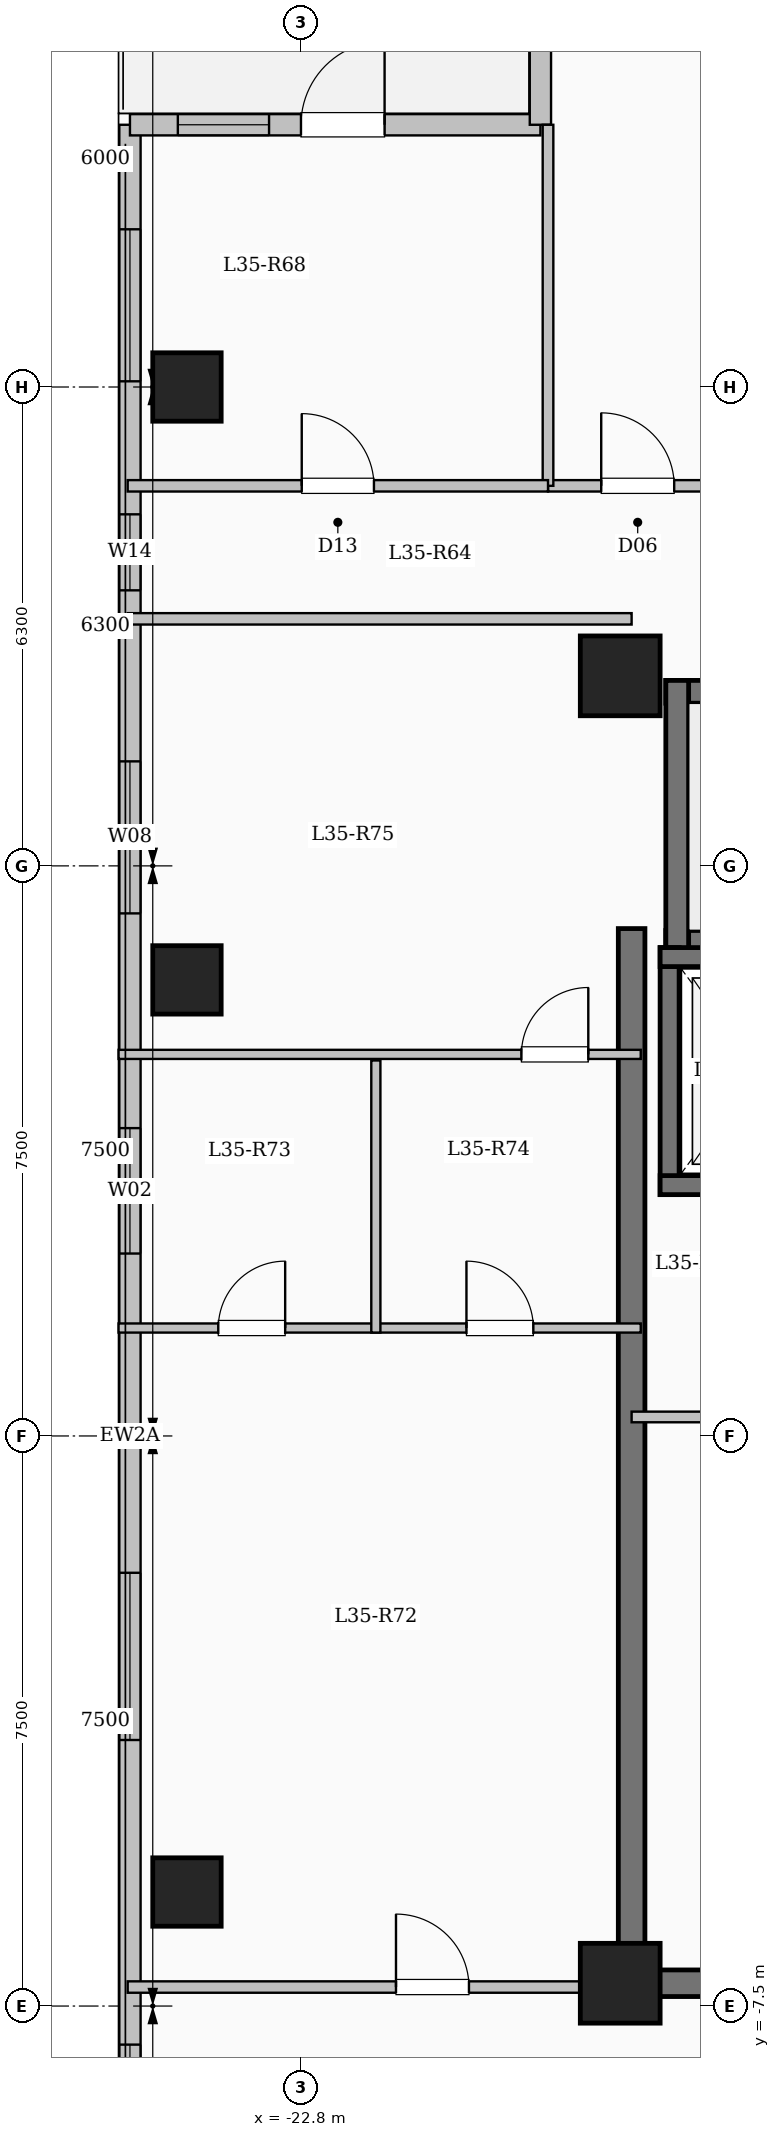
"""IFC4 building model, lengths in metres.
Left out: names, types, materials, properties, quantities, classifications, styles, units other than length and angle.
Written with IfcOpenShell. Run it as: python <this file> out.ifc"""

import sys

from ifc_helpers import new_model, si_unit, direction, frame, frame_2d, origin, origin_2d, place, context, subcontext, project, spatial, rectangle, extrude, element, fill, save


model = new_model("IFC4")
c1 = context("Model", 3, precision=1e-05, world=origin(), true_north=direction((0.0, 1.0)))
c2 = subcontext(c1, "Body", "Model", "MODEL_VIEW")
j1 = project(units=[si_unit("LENGTHUNIT", "METRE"), si_unit("PLANEANGLEUNIT", "RADIAN")], contexts=[c1])
p1 = place(None, origin())
s1 = spatial("IfcSite", under=j1, at=p1, CompositionType="ELEMENT")
p2 = place(p1, origin())
s2 = spatial("IfcBuilding", under=s1, at=p2, CompositionType="ELEMENT")
p3 = place(p2, frame((0.0, 0.0, 132.6)))
s3 = spatial("IfcBuildingStorey", under=s2, at=p3, CompositionType="ELEMENT", Elevation=132.6)
for number, where, z_axis, x_axis in (
    (1, (-18.6, -7.2, 0.0), (0.0, 0.0, 1.0), (1.0, 0.0, 0.0)),
    (2, (-18.6, 10.0, 0.0), (0.0, 0.0, 1.0), (1.0, 0.0, 0.0)),
):
    element("IfcColumn", number, at=place(p3, frame(where, z_axis=z_axis, x_axis=x_axis)), inside=s3, PredefinedType="COLUMN", context=c2, shape_type="SweptSolid", body=[
        extrude(rectangle(XDim=1.05, YDim=1.05, at=origin_2d()), origin(), (0.0, 0.0, 1.0), 3.35),
    ])
for number, where, z_axis, x_axis in (
    (3, (-24.3, -6.0, 0.0), (0.0, 0.0, 1.0), (1.0, 0.0, 0.0)),
    (4, (-24.3, 6.0, 0.0), (0.0, 0.0, 1.0), (1.0, 0.0, 0.0)),
    (5, (-24.3, 13.8, 0.0), (0.0, 0.0, 1.0), (1.0, 0.0, 0.0)),
):
    element("IfcColumn", number, at=place(p3, frame(where, z_axis=z_axis, x_axis=x_axis)), inside=s3, PredefinedType="COLUMN", context=c2, shape_type="SweptSolid", body=[
        extrude(rectangle(XDim=0.9, YDim=0.9, at=origin_2d()), origin(), (0.0, 0.0, 1.0), 3.35),
    ])
p4 = place(p3, frame((-25.05, -17.25, 0.0), z_axis=(0.0, 0.0, 1.0), x_axis=(0.0, 1.0, 0.0)))
e6 = element("IfcWall", 6, at=p4, inside=s3, PredefinedType="SOLIDWALL", context=c2, shape_type="SweptSolid", body=[
    extrude(rectangle(XDim=34.5, YDim=0.28, at=frame_2d((17.25, 0.0))), origin(), (0.0, 0.0, 1.0), 3.1),
])
p5 = place(p4, frame((2.35, 0.0, 0.9)))
e7 = element("IfcOpeningElement", 7, at=p5, cuts=e6, PredefinedType="OPENING", context=c2, shape_type="SweptSolid", body=[
    extrude(rectangle(XDim=2.2, YDim=1.75, at=frame_2d((1.1, 0.875))), frame((0.0, 0.15, 0.0), z_axis=(0.0, -1.0, 0.0), x_axis=(1.0, 0.0, 0.0)), (0.0, 0.0, 1.0), 0.3),
])
p6 = place(p4, frame((7.742, 0.0, 0.9)))
e8 = element("IfcOpeningElement", 8, at=p6, cuts=e6, PredefinedType="OPENING", context=c2, shape_type="SweptSolid", body=[
    extrude(rectangle(XDim=1.5, YDim=1.65, at=frame_2d((0.75, 0.825))), frame((0.0, 0.15, 0.0), z_axis=(0.0, -1.0, 0.0), x_axis=(1.0, 0.0, 0.0)), (0.0, 0.0, 1.0), 0.3),
])
p7 = place(p4, frame((13.25, 0.0, 0.9)))
e9 = element("IfcOpeningElement", 9, at=p7, cuts=e6, PredefinedType="OPENING", context=c2, shape_type="SweptSolid", body=[
    extrude(rectangle(XDim=2.2, YDim=1.75, at=frame_2d((1.1, 0.875))), frame((0.0, 0.15, 0.0), z_axis=(0.0, -1.0, 0.0), x_axis=(1.0, 0.0, 0.0)), (0.0, 0.0, 1.0), 0.3),
])
p8 = place(p4, frame((19.65, 0.0, 0.9)))
e10 = element("IfcOpeningElement", 10, at=p8, cuts=e6, PredefinedType="OPENING", context=c2, shape_type="SweptSolid", body=[
    extrude(rectangle(XDim=1.65, YDim=1.6, at=frame_2d((0.825, 0.8))), frame((0.0, 0.15, 0.0), z_axis=(0.0, -1.0, 0.0), x_axis=(1.0, 0.0, 0.0)), (0.0, 0.0, 1.0), 0.3),
])
p9 = place(p4, frame((24.125, 0.0, 0.9)))
e11 = element("IfcOpeningElement", 11, at=p9, cuts=e6, PredefinedType="OPENING", context=c2, shape_type="SweptSolid", body=[
    extrude(rectangle(XDim=2.0, YDim=1.7, at=frame_2d((1.0, 0.85))), frame((0.0, 0.15, 0.0), z_axis=(0.0, -1.0, 0.0), x_axis=(1.0, 0.0, 0.0)), (0.0, 0.0, 1.0), 0.3),
])
p10 = place(p4, frame((28.375, 0.0, 0.95)))
e12 = element("IfcOpeningElement", 12, at=p10, cuts=e6, PredefinedType="OPENING", context=c2, shape_type="SweptSolid", body=[
    extrude(rectangle(XDim=1.0, YDim=1.5, at=frame_2d((0.5, 0.75))), frame((0.0, 0.15, 0.0), z_axis=(0.0, -1.0, 0.0), x_axis=(1.0, 0.0, 0.0)), (0.0, 0.0, 1.0), 0.3),
])
p11 = place(p4, frame((31.125, 0.0, 0.9)))
e13 = element("IfcOpeningElement", 13, at=p11, cuts=e6, PredefinedType="OPENING", context=c2, shape_type="SweptSolid", body=[
    extrude(rectangle(XDim=2.0, YDim=1.7, at=frame_2d((1.0, 0.85))), frame((0.0, 0.15, 0.0), z_axis=(0.0, -1.0, 0.0), x_axis=(1.0, 0.0, 0.0)), (0.0, 0.0, 1.0), 0.3),
])
p12 = place(p3, frame((-25.05, 17.25, 0.0), z_axis=(0.0, 0.0, 1.0), x_axis=(1.0, 0.0, 0.0)))
e14 = element("IfcWall", 14, at=p12, inside=s3, PredefinedType="SOLIDWALL", context=c2, shape_type="SweptSolid", body=[
    extrude(rectangle(XDim=5.4, YDim=0.28, at=frame_2d((2.7, 0.0))), origin(), (0.0, 0.0, 1.0), 3.1),
])
p13 = place(p12, frame((2.25, 0.0, 0.0)))
e15 = element("IfcOpeningElement", 15, at=p13, cuts=e14, PredefinedType="OPENING", context=c2, shape_type="SweptSolid", body=[
    extrude(rectangle(XDim=1.1, YDim=2.2, at=frame_2d((0.55, 1.1))), frame((0.0, 0.15, 0.0), z_axis=(0.0, -1.0, 0.0), x_axis=(1.0, 0.0, 0.0)), (0.0, 0.0, 1.0), 0.3),
])
p14 = place(p12, frame((0.63, 0.0, 0.95)))
e16 = element("IfcOpeningElement", 16, at=p14, cuts=e14, PredefinedType="OPENING", context=c2, shape_type="SweptSolid", body=[
    extrude(rectangle(XDim=1.2, YDim=1.5, at=frame_2d((0.6, 0.75))), frame((0.0, 0.15, 0.0), z_axis=(0.0, -1.0, 0.0), x_axis=(1.0, 0.0, 0.0)), (0.0, 0.0, 1.0), 0.3),
])
p15 = place(p3, frame((-19.65, 17.25, 0.0), z_axis=(0.0, 0.0, 1.0), x_axis=(0.0, 1.0, 0.0)))
e17 = element("IfcWall", 17, at=p15, inside=s3, PredefinedType="SOLIDWALL", context=c2, shape_type="SweptSolid", body=[
    extrude(rectangle(XDim=3.9, YDim=0.28, at=frame_2d((1.95, 0.0))), origin(), (0.0, 0.0, 1.0), 3.1),
])
p16 = place(p15, frame((1.107, 0.0, 0.9)))
e18 = element("IfcOpeningElement", 18, at=p16, cuts=e17, PredefinedType="OPENING", context=c2, shape_type="SweptSolid", body=[
    extrude(rectangle(XDim=1.65, YDim=1.6, at=frame_2d((0.825, 0.8))), frame((0.0, 0.15, 0.0), z_axis=(0.0, -1.0, 0.0), x_axis=(1.0, 0.0, 0.0)), (0.0, 0.0, 1.0), 0.3),
])
p17 = place(p3, frame((-18.0, 9.79, 0.0), z_axis=(0.0, 0.0, 1.0), x_axis=(1.0, 0.0, 0.0)))
e19 = element("IfcWall", 19, at=p17, inside=s3, PredefinedType="SHEAR", context=c2, shape_type="SweptSolid", body=[
    extrude(rectangle(XDim=8.0, YDim=0.3, at=frame_2d((4.0, 0.0))), origin(), (0.0, 0.0, 1.0), 3.35),
])
p18 = place(p3, frame((-18.0, 6.5, 0.0), z_axis=(0.0, 0.0, 1.0), x_axis=(1.0, 0.0, 0.0)))
e20 = element("IfcWall", 20, at=p18, inside=s3, PredefinedType="SHEAR", context=c2, shape_type="SweptSolid", body=[
    extrude(rectangle(XDim=8.0, YDim=0.3, at=frame_2d((4.0, 0.0))), origin(), (0.0, 0.0, 1.0), 3.35),
])
p19 = place(p18, frame((6.45, 0.0, 0.0)))
e21 = element("IfcOpeningElement", 21, at=p19, cuts=e20, PredefinedType="OPENING", context=c2, shape_type="SweptSolid", body=[
    extrude(rectangle(XDim=1.0, YDim=2.15, at=frame_2d((0.5, 1.075))), frame((0.0, 0.16, 0.0), z_axis=(0.0, -1.0, 0.0), x_axis=(1.0, 0.0, 0.0)), (0.0, 0.0, 1.0), 0.32),
])
p20 = place(p3, frame((-17.85, 6.35, 0.0), z_axis=(0.0, 0.0, 1.0), x_axis=(0.0, 1.0, 0.0)))
e22 = element("IfcWall", 22, at=p20, inside=s3, PredefinedType="SHEAR", context=c2, shape_type="SweptSolid", body=[
    extrude(rectangle(XDim=3.59, YDim=0.3, at=frame_2d((1.795, 0.0))), origin(), (0.0, 0.0, 1.0), 3.35),
])
p21 = place(p3, frame((-17.95, 3.175, 0.0), z_axis=(0.0, 0.0, 1.0), x_axis=(0.0, 1.0, 0.0)))
e23 = element("IfcWall", 23, at=p21, inside=s3, PredefinedType="SHEAR", context=c2, shape_type="SweptSolid", body=[
    extrude(rectangle(XDim=3.25, YDim=0.25, at=frame_2d((1.625, 0.0))), origin(), (0.0, 0.0, 1.0), 3.35),
])
for number, where, z_axis, x_axis in (
    (24, (-18.075, 3.3, 0.0), (0.0, 0.0, 1.0), (1.0, 0.0, 0.0)),
    (25, (-18.075, 6.3, 0.0), (0.0, 0.0, 1.0), (1.0, 0.0, 0.0)),
):
    element("IfcWall", number, at=place(p3, frame(where, z_axis=z_axis, x_axis=x_axis)), inside=s3, PredefinedType="SHEAR", context=c2, shape_type="SweptSolid", body=[
        extrude(rectangle(XDim=2.55, YDim=0.25, at=frame_2d((1.275, 0.0))), origin(), (0.0, 0.0, 1.0), 3.35),
    ])
p22 = place(p3, frame((-18.45, -7.375, 0.0), z_axis=(0.0, 0.0, 1.0), x_axis=(0.0, 1.0, 0.0)))
e26 = element("IfcWall", 26, at=p22, inside=s3, PredefinedType="SHEAR", context=c2, shape_type="SweptSolid", body=[
    extrude(rectangle(XDim=14.05, YDim=0.35, at=frame_2d((7.025, 0.0))), origin(), (0.0, 0.0, 1.0), 3.35),
])
p23 = place(p3, frame((-18.625, -7.2, 0.0), z_axis=(0.0, 0.0, 1.0), x_axis=(1.0, 0.0, 0.0)))
e27 = element("IfcWall", 27, at=p23, inside=s3, PredefinedType="SHEAR", context=c2, shape_type="SweptSolid", body=[
    extrude(rectangle(XDim=8.55, YDim=0.35, at=frame_2d((4.275, 0.0))), origin(), (0.0, 0.0, 1.0), 3.35),
])
p24 = place(p3, frame((-18.45, 0.25, 0.0), z_axis=(0.0, 0.0, 1.0), x_axis=(1.0, 0.0, 0.0)))
e28 = element("IfcWall", 28, at=p24, inside=s3, PredefinedType="PARTITIONING", context=c2, shape_type="SweptSolid", body=[
    extrude(rectangle(XDim=3.05, YDim=0.14, at=frame_2d((1.525, 0.0))), origin(), (0.0, 0.0, 1.0), 3.1),
])
p25 = place(p24, frame((1.05, 0.0, 0.0)))
e29 = element("IfcOpeningElement", 29, at=p25, cuts=e28, PredefinedType="OPENING", context=c2, shape_type="SweptSolid", body=[
    extrude(rectangle(XDim=0.9, YDim=2.08, at=frame_2d((0.45, 1.04))), frame((0.0, 0.08, 0.0), z_axis=(0.0, -1.0, 0.0), x_axis=(1.0, 0.0, 0.0)), (0.0, 0.0, 1.0), 0.16),
])
p26 = place(p3, frame((-19.55, 12.5, 0.0), z_axis=(0.0, 0.0, 1.0), x_axis=(1.0, 0.0, 0.0)))
e30 = element("IfcWall", 30, at=p26, inside=s3, PredefinedType="PARTITIONING", context=c2, shape_type="SweptSolid", body=[
    extrude(rectangle(XDim=15.7, YDim=0.15, at=frame_2d((7.85, 0.0))), origin(), (0.0, 0.0, 1.0), 3.1),
])
p27 = place(p26, frame((0.7, 0.0, 0.0)))
e31 = element("IfcOpeningElement", 31, at=p27, cuts=e30, PredefinedType="OPENING", context=c2, shape_type="SweptSolid", body=[
    extrude(rectangle(XDim=0.96, YDim=2.15, at=frame_2d((0.48, 1.075))), frame((0.0, 0.085, 0.0), z_axis=(0.0, -1.0, 0.0), x_axis=(1.0, 0.0, 0.0)), (0.0, 0.0, 1.0), 0.17),
])
p28 = place(p26, frame((10.348, 0.0, 0.0)))
e32 = element("IfcOpeningElement", 32, at=p28, cuts=e30, PredefinedType="OPENING", context=c2, shape_type="SweptSolid", body=[
    extrude(rectangle(XDim=0.96, YDim=2.15, at=frame_2d((0.48, 1.075))), frame((0.0, 0.085, 0.0), z_axis=(0.0, -1.0, 0.0), x_axis=(1.0, 0.0, 0.0)), (0.0, 0.0, 1.0), 0.17),
])
p29 = place(p3, frame((-25.08, -7.25, 0.0), z_axis=(0.0, 0.0, 1.0), x_axis=(1.0, 0.0, 0.0)))
e33 = element("IfcWall", 33, at=p29, inside=s3, PredefinedType="PARTITIONING", context=c2, shape_type="SweptSolid", body=[
    extrude(rectangle(XDim=6.63, YDim=0.15, at=frame_2d((3.315, 0.0))), origin(), (0.0, 0.0, 1.0), 3.1),
])
p30 = place(p29, frame((3.53, 0.0, 0.0)))
e34 = element("IfcOpeningElement", 34, at=p30, cuts=e33, PredefinedType="OPENING", context=c2, shape_type="SweptSolid", body=[
    extrude(rectangle(XDim=0.96, YDim=2.15, at=frame_2d((0.48, 1.075))), frame((0.0, 0.085, 0.0), z_axis=(0.0, -1.0, 0.0), x_axis=(1.0, 0.0, 0.0)), (0.0, 0.0, 1.0), 0.17),
])
p31 = place(p3, frame((-25.08, 10.75, 0.0), z_axis=(0.0, 0.0, 1.0), x_axis=(1.0, 0.0, 0.0)))
e35 = element("IfcWall", 35, at=p31, inside=s3, PredefinedType="PARTITIONING", context=c2, shape_type="SweptSolid", body=[
    extrude(rectangle(XDim=6.63, YDim=0.15, at=frame_2d((3.315, 0.0))), origin(), (0.0, 0.0, 1.0), 3.1),
])
p32 = place(p3, frame((-19.55, 12.5, 0.0), z_axis=(0.0, 0.0, 1.0), x_axis=(0.0, 1.0, 0.0)))
e36 = element("IfcWall", 36, at=p32, inside=s3, PredefinedType="PARTITIONING", context=c2, shape_type="SweptSolid", body=[
    extrude(rectangle(XDim=4.75, YDim=0.14, at=frame_2d((2.375, 0.0))), origin(), (0.0, 0.0, 1.0), 3.1),
])
p33 = place(p3, frame((-25.08, 12.5, 0.0), z_axis=(0.0, 0.0, 1.0), x_axis=(1.0, 0.0, 0.0)))
e37 = element("IfcWall", 37, at=p33, inside=s3, PredefinedType="PARTITIONING", context=c2, shape_type="SweptSolid", body=[
    extrude(rectangle(XDim=5.53, YDim=0.15, at=frame_2d((2.765, 0.0))), origin(), (0.0, 0.0, 1.0), 3.1),
])
p34 = place(p33, frame((2.29, 0.0, 0.0)))
e38 = element("IfcOpeningElement", 38, at=p34, cuts=e37, PredefinedType="OPENING", context=c2, shape_type="SweptSolid", body=[
    extrude(rectangle(XDim=0.95, YDim=2.15, at=frame_2d((0.475, 1.075))), frame((0.0, 0.085, 0.0), z_axis=(0.0, -1.0, 0.0), x_axis=(1.0, 0.0, 0.0)), (0.0, 0.0, 1.0), 0.17),
])
p35 = place(p3, frame((-25.2, 1.42, 0.0), z_axis=(0.0, 0.0, 1.0), x_axis=(1.0, 0.0, 0.0)))
e39 = element("IfcWall", 39, at=p35, inside=s3, PredefinedType="PARTITIONING", context=c2, shape_type="SweptSolid", body=[
    extrude(rectangle(XDim=6.87, YDim=0.12, at=frame_2d((3.435, 0.0))), origin(), (0.0, 0.0, 1.0), 3.1),
])
p36 = place(p35, frame((1.312, 0.0, 0.0)))
e40 = element("IfcOpeningElement", 40, at=p36, cuts=e39, PredefinedType="OPENING", context=c2, shape_type="SweptSolid", body=[
    extrude(rectangle(XDim=0.88, YDim=2.1, at=frame_2d((0.44, 1.05))), frame((0.0, 0.07, 0.0), z_axis=(0.0, -1.0, 0.0), x_axis=(1.0, 0.0, 0.0)), (0.0, 0.0, 1.0), 0.14),
])
p37 = place(p35, frame((4.577, 0.0, 0.0)))
e41 = element("IfcOpeningElement", 41, at=p37, cuts=e39, PredefinedType="OPENING", context=c2, shape_type="SweptSolid", body=[
    extrude(rectangle(XDim=0.88, YDim=2.1, at=frame_2d((0.44, 1.05))), frame((0.0, 0.07, 0.0), z_axis=(0.0, -1.0, 0.0), x_axis=(1.0, 0.0, 0.0)), (0.0, 0.0, 1.0), 0.14),
])
p38 = place(p3, frame((-25.2, 5.02, 0.0), z_axis=(0.0, 0.0, 1.0), x_axis=(1.0, 0.0, 0.0)))
e42 = element("IfcWall", 42, at=p38, inside=s3, PredefinedType="PARTITIONING", context=c2, shape_type="SweptSolid", body=[
    extrude(rectangle(XDim=6.87, YDim=0.12, at=frame_2d((3.435, 0.0))), origin(), (0.0, 0.0, 1.0), 3.1),
])
p39 = place(p38, frame((5.3, 0.0, 0.0)))
e43 = element("IfcOpeningElement", 43, at=p39, cuts=e42, PredefinedType="OPENING", context=c2, shape_type="SweptSolid", body=[
    extrude(rectangle(XDim=0.88, YDim=2.1, at=frame_2d((0.44, 1.05))), frame((0.0, 0.07, 0.0), z_axis=(0.0, -1.0, 0.0), x_axis=(1.0, 0.0, 0.0)), (0.0, 0.0, 1.0), 0.14),
])
p40 = place(p3, frame((-21.815, 1.36, 0.0), z_axis=(0.0, 0.0, 1.0), x_axis=(0.0, 1.0, 0.0)))
e44 = element("IfcWall", 44, at=p40, inside=s3, PredefinedType="PARTITIONING", context=c2, shape_type="SweptSolid", body=[
    extrude(rectangle(XDim=3.58, YDim=0.12, at=frame_2d((1.79, 0.0))), origin(), (0.0, 0.0, 1.0), 3.1),
])
p41 = place(p6, origin())
e45 = element("IfcWindow", 45, at=p41, inside=s3, PartitioningType="SINGLE_PANEL", PredefinedType="WINDOW", context=c2, shape_type="SweptSolid", body=[
    extrude(rectangle(XDim=1.5, YDim=1.65, at=frame_2d((0.75, 0.825))), frame((0.0, 0.03, 0.0), z_axis=(0.0, -1.0, 0.0), x_axis=(1.0, 0.0, 0.0)), (0.0, 0.0, 1.0), 0.06),
])
fill(e8, e45)
p42 = place(p7, origin())
e46 = element("IfcWindow", 46, at=p42, inside=s3, PartitioningType="SINGLE_PANEL", PredefinedType="WINDOW", context=c2, shape_type="SweptSolid", body=[
    extrude(rectangle(XDim=2.2, YDim=1.75, at=frame_2d((1.1, 0.875))), frame((0.0, 0.03, 0.0), z_axis=(0.0, -1.0, 0.0), x_axis=(1.0, 0.0, 0.0)), (0.0, 0.0, 1.0), 0.06),
])
fill(e9, e46)
p43 = place(p8, origin())
e47 = element("IfcWindow", 47, at=p43, inside=s3, PartitioningType="SINGLE_PANEL", PredefinedType="WINDOW", context=c2, shape_type="SweptSolid", body=[
    extrude(rectangle(XDim=1.65, YDim=1.6, at=frame_2d((0.825, 0.8))), frame((0.0, 0.03, 0.0), z_axis=(0.0, -1.0, 0.0), x_axis=(1.0, 0.0, 0.0)), (0.0, 0.0, 1.0), 0.06),
])
fill(e10, e47)
p44 = place(p9, origin())
e48 = element("IfcWindow", 48, at=p44, inside=s3, PartitioningType="SINGLE_PANEL", PredefinedType="WINDOW", context=c2, shape_type="SweptSolid", body=[
    extrude(rectangle(XDim=2.0, YDim=1.7, at=frame_2d((1.0, 0.85))), frame((0.0, 0.03, 0.0), z_axis=(0.0, -1.0, 0.0), x_axis=(1.0, 0.0, 0.0)), (0.0, 0.0, 1.0), 0.06),
])
fill(e11, e48)
p45 = place(p10, origin())
e49 = element("IfcWindow", 49, at=p45, inside=s3, PartitioningType="SINGLE_PANEL", PredefinedType="WINDOW", context=c2, shape_type="SweptSolid", body=[
    extrude(rectangle(XDim=1.0, YDim=1.5, at=frame_2d((0.5, 0.75))), frame((0.0, 0.03, 0.0), z_axis=(0.0, -1.0, 0.0), x_axis=(1.0, 0.0, 0.0)), (0.0, 0.0, 1.0), 0.06),
])
fill(e12, e49)
p46 = place(p11, origin())
e50 = element("IfcWindow", 50, at=p46, inside=s3, PartitioningType="SINGLE_PANEL", PredefinedType="WINDOW", context=c2, shape_type="SweptSolid", body=[
    extrude(rectangle(XDim=2.0, YDim=1.7, at=frame_2d((1.0, 0.85))), frame((0.0, 0.03, 0.0), z_axis=(0.0, -1.0, 0.0), x_axis=(1.0, 0.0, 0.0)), (0.0, 0.0, 1.0), 0.06),
])
fill(e13, e50)
p47 = place(p13, origin())
e51 = element("IfcDoor", 51, at=p47, inside=s3, OperationType="SINGLE_SWING_RIGHT", PredefinedType="DOOR", context=c2, shape_type="SweptSolid", body=[
    extrude(rectangle(XDim=1.1, YDim=2.2, at=frame_2d((0.55, 1.1))), frame((0.0, 0.025, 0.0), z_axis=(0.0, -1.0, 0.0), x_axis=(1.0, 0.0, 0.0)), (0.0, 0.0, 1.0), 0.05),
])
fill(e15, e51)
p48 = place(p14, origin())
e52 = element("IfcWindow", 52, at=p48, inside=s3, PartitioningType="SINGLE_PANEL", PredefinedType="WINDOW", context=c2, shape_type="SweptSolid", body=[
    extrude(rectangle(XDim=1.2, YDim=1.5, at=frame_2d((0.6, 0.75))), frame((0.0, 0.03, 0.0), z_axis=(0.0, -1.0, 0.0), x_axis=(1.0, 0.0, 0.0)), (0.0, 0.0, 1.0), 0.06),
])
fill(e16, e52)
p49 = place(p27, origin())
e53 = element("IfcDoor", 53, at=p49, inside=s3, OperationType="SINGLE_SWING_LEFT", PredefinedType="DOOR", context=c2, shape_type="SweptSolid", body=[
    extrude(rectangle(XDim=0.96, YDim=2.15, at=frame_2d((0.48, 1.075))), frame((0.0, 0.025, 0.0), z_axis=(0.0, -1.0, 0.0), x_axis=(1.0, 0.0, 0.0)), (0.0, 0.0, 1.0), 0.05),
])
fill(e31, e53)
p50 = place(p34, origin())
e54 = element("IfcDoor", 54, at=p50, inside=s3, OperationType="SINGLE_SWING_LEFT", PredefinedType="DOOR", context=c2, shape_type="SweptSolid", body=[
    extrude(rectangle(XDim=0.95, YDim=2.15, at=frame_2d((0.475, 1.075))), frame((0.0, 0.025, 0.0), z_axis=(0.0, -1.0, 0.0), x_axis=(1.0, 0.0, 0.0)), (0.0, 0.0, 1.0), 0.05),
])
fill(e38, e54)
p51 = place(p30, origin())
e55 = element("IfcDoor", 55, at=p51, inside=s3, OperationType="SINGLE_SWING_LEFT", PredefinedType="DOOR", context=c2, shape_type="SweptSolid", body=[
    extrude(rectangle(XDim=0.96, YDim=2.15, at=frame_2d((0.48, 1.075))), frame((0.0, 0.025, 0.0), z_axis=(0.0, -1.0, 0.0), x_axis=(1.0, 0.0, 0.0)), (0.0, 0.0, 1.0), 0.05),
])
fill(e34, e55)
p52 = place(p36, origin())
e56 = element("IfcDoor", 56, at=p52, inside=s3, OperationType="SINGLE_SWING_RIGHT", PredefinedType="DOOR", context=c2, shape_type="SweptSolid", body=[
    extrude(rectangle(XDim=0.88, YDim=2.1, at=frame_2d((0.44, 1.05))), frame((0.0, 0.025, 0.0), z_axis=(0.0, -1.0, 0.0), x_axis=(1.0, 0.0, 0.0)), (0.0, 0.0, 1.0), 0.05),
])
fill(e40, e56)
p53 = place(p37, origin())
e57 = element("IfcDoor", 57, at=p53, inside=s3, OperationType="SINGLE_SWING_LEFT", PredefinedType="DOOR", context=c2, shape_type="SweptSolid", body=[
    extrude(rectangle(XDim=0.88, YDim=2.1, at=frame_2d((0.44, 1.05))), frame((0.0, 0.025, 0.0), z_axis=(0.0, -1.0, 0.0), x_axis=(1.0, 0.0, 0.0)), (0.0, 0.0, 1.0), 0.05),
])
fill(e41, e57)
p54 = place(p39, origin())
e58 = element("IfcDoor", 58, at=p54, inside=s3, OperationType="SINGLE_SWING_RIGHT", PredefinedType="DOOR", context=c2, shape_type="SweptSolid", body=[
    extrude(rectangle(XDim=0.88, YDim=2.1, at=frame_2d((0.44, 1.05))), frame((0.0, 0.025, 0.0), z_axis=(0.0, -1.0, 0.0), x_axis=(1.0, 0.0, 0.0)), (0.0, 0.0, 1.0), 0.05),
])
fill(e43, e58)
save(model, sys.argv[1])
